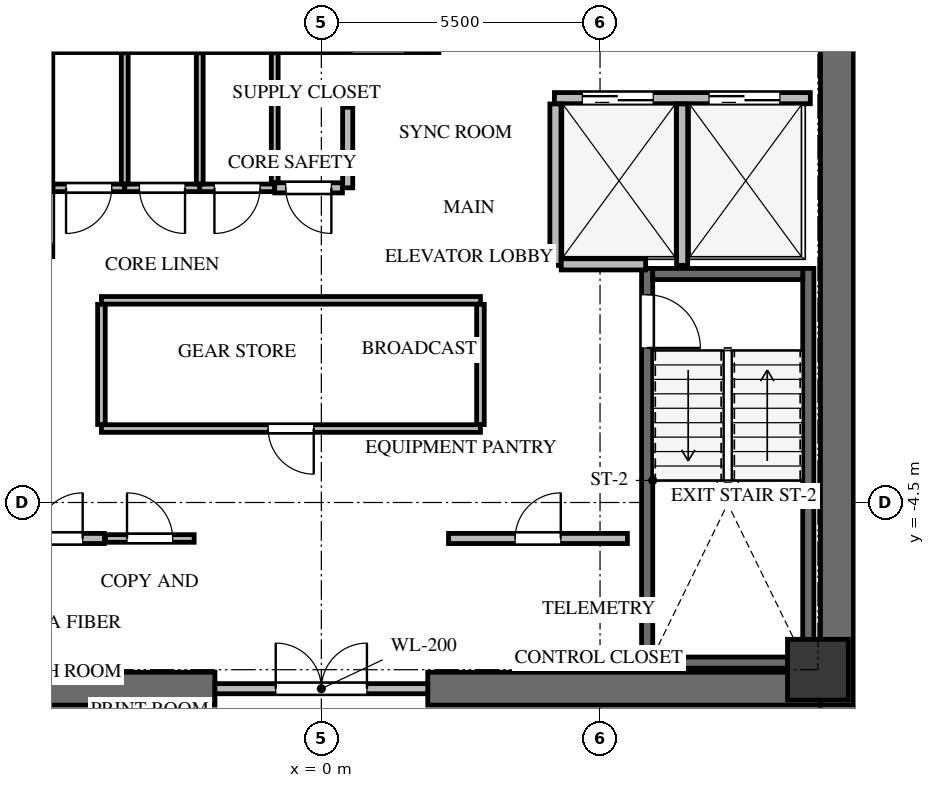
"""IFC4 building model, lengths in metres.
Left out: names, types, materials, properties, quantities, classifications, styles, units other than length and angle.
Written with IfcOpenShell. Run it as: python <this file> out.ifc"""

import sys

from ifc_helpers import new_model, si_unit, direction, frame, frame_2d, origin, origin_2d, place, context, subcontext, project, spatial, rectangle, extrude, source, transform, mapped, element, fill, save


model = new_model("IFC4")
c1 = context("Model", 3, precision=1e-05, world=origin(), true_north=direction((0.0, 1.0)))
c2 = subcontext(c1, "Body", "Model", "MODEL_VIEW")
j1 = project(units=[si_unit("LENGTHUNIT", "METRE"), si_unit("PLANEANGLEUNIT", "RADIAN")], contexts=[c1])
p1 = place(None, origin())
s1 = spatial("IfcSite", under=j1, at=p1, CompositionType="ELEMENT")
p2 = place(p1, origin())
s2 = spatial("IfcBuilding", under=s1, at=p2, CompositionType="ELEMENT")
p3 = place(p2, frame((0.0, 0.0, 180.4)))
s3 = spatial("IfcBuildingStorey", under=s2, at=p3, CompositionType="ELEMENT", Elevation=180.4)
p4 = place(p3, frame((10.175, -8.5, 0.0), z_axis=(0.0, 0.0, 1.0), x_axis=(0.0, 1.0, 0.0)))
e1 = element("IfcWall", 1, at=p4, inside=s3, PredefinedType="SHEAR", context=c2, shape_type="SweptSolid", body=[
    extrude(rectangle(XDim=17.0, YDim=0.65, at=frame_2d((8.5, 0.0))), origin(), (0.0, 0.0, 1.0), 3.3),
])
for number, where, z_axis, x_axis in (
    (2, (-9.85, -8.175, 0.0), (0.0, 0.0, 1.0), (1.0, 0.0, 0.0)),
    (3, (2.1, -8.175, 0.0), (0.0, 0.0, 1.0), (1.0, 0.0, 0.0)),
):
    element("IfcWall", number, at=place(p3, frame(where, z_axis=z_axis, x_axis=x_axis)), inside=s3, PredefinedType="SHEAR", context=c2, shape_type="SweptSolid", body=[
        extrude(rectangle(XDim=7.75, YDim=0.65, at=frame_2d((3.875, 0.0))), origin(), (0.0, 0.0, 1.0), 3.3),
    ])
p5 = place(p3, frame((9.61, -7.77, -0.24), z_axis=(0.0, 0.0, 1.0), x_axis=(0.0, 1.0, 0.0)))
e4 = element("IfcWall", 4, at=p5, inside=s3, PredefinedType="SHEAR", context=c2, shape_type="SweptSolid", body=[
    extrude(rectangle(XDim=7.89, YDim=0.22, at=frame_2d((3.945, 0.0))), origin(), (0.0, 0.0, 1.0), 3.3),
])
p6 = place(p3, frame((6.43, 0.12, -0.24), z_axis=(0.0, 0.0, 1.0), x_axis=(0.0, -1.0, 0.0)))
e5 = element("IfcWall", 5, at=p6, inside=s3, PredefinedType="SHEAR", context=c2, shape_type="SweptSolid", body=[
    extrude(rectangle(XDim=7.89, YDim=0.22, at=frame_2d((3.945, 0.0))), origin(), (0.0, 0.0, 1.0), 3.3),
])
p7 = place(p6, frame((0.52, 0.0, 0.0)))
e6 = element("IfcOpeningElement", 6, at=p7, cuts=e5, PredefinedType="OPENING", context=c2, shape_type="SweptSolid", body=[
    extrude(rectangle(XDim=1.05, YDim=2.15, at=frame_2d((0.525, 1.075))), frame((0.0, 0.12, 0.0), z_axis=(0.0, -1.0, 0.0), x_axis=(1.0, 0.0, 0.0)), (0.0, 0.0, 1.0), 0.24),
])
for number, where, z_axis, x_axis in (
    (7, (6.54, -7.66, -0.24), (0.0, 0.0, 1.0), (1.0, 0.0, 0.0)),
    (8, (9.5, 0.01, -0.24), (0.0, 0.0, 1.0), (-1.0, 0.0, 0.0)),
):
    element("IfcWall", number, at=place(p3, frame(where, z_axis=z_axis, x_axis=x_axis)), inside=s3, PredefinedType="SHEAR", context=c2, shape_type="SweptSolid", body=[
        extrude(rectangle(XDim=2.96, YDim=0.22, at=frame_2d((1.48, 0.0))), origin(), (0.0, 0.0, 1.0), 3.3),
    ])
for number, where, z_axis, x_axis in (
    (9, (2.21, 4.38, -0.24), (0.0, 0.0, 1.0), (0.0, 1.0, 0.0)),
    (10, (-5.36, 7.78, -0.24), (0.0, 0.0, 1.0), (0.0, -1.0, 0.0)),
):
    element("IfcWall", number, at=place(p3, frame(where, z_axis=z_axis, x_axis=x_axis)), inside=s3, PredefinedType="SHEAR", context=c2, shape_type="SweptSolid", body=[
        extrude(rectangle(XDim=3.4, YDim=0.22, at=frame_2d((1.7, 0.0))), origin(), (0.0, 0.0, 1.0), 3.3),
    ])
p8 = place(p3, frame((-5.25, 4.49, -0.24), z_axis=(0.0, 0.0, 1.0), x_axis=(1.0, 0.0, 0.0)))
e11 = element("IfcWall", 11, at=p8, inside=s3, PredefinedType="SHEAR", context=c2, shape_type="SweptSolid", body=[
    extrude(rectangle(XDim=7.35, YDim=0.22, at=frame_2d((3.675, 0.0))), origin(), (0.0, 0.0, 1.0), 3.3),
])
p9 = place(p8, frame((5.85, 0.0, 0.0)))
e12 = element("IfcOpeningElement", 12, at=p9, cuts=e11, PredefinedType="OPENING", context=c2, shape_type="SweptSolid", body=[
    extrude(rectangle(XDim=1.05, YDim=2.15, at=frame_2d((0.525, 1.075))), frame((0.0, 0.12, 0.0), z_axis=(0.0, -1.0, 0.0), x_axis=(1.0, 0.0, 0.0)), (0.0, 0.0, 1.0), 0.24),
])
m1 = source(origin(), c2, "Body", "SweptSolid", [
    extrude(rectangle(XDim=1.2, YDim=1.2, at=origin_2d()), origin(), (0.0, 0.0, 1.0), 3.3),
])
p10 = place(p3, frame((9.8, -7.8, -0.24), z_axis=(0.0, 0.0, 1.0), x_axis=(1.0, 0.0, 0.0)))
e13 = element("IfcColumn", 13, at=p10, inside=s3, PredefinedType="COLUMN", context=c2, shape_type="MappedRepresentation", body=[
    mapped(m1, transform((0.0, 0.0, 0.0), x_axis=(1.0, 0.0, 0.0), y_axis=(0.0, 1.0, 0.0), z_axis=(0.0, 0.0, 1.0), scale=1.0)),
])
p11 = place(p3, frame((-2.1, -8.175, 0.0), z_axis=(0.0, 0.0, 1.0), x_axis=(1.0, 0.0, 0.0)))
e14 = element("IfcWall", 14, at=p11, inside=s3, PredefinedType="SOLIDWALL", context=c2, shape_type="SweptSolid", body=[
    extrude(rectangle(XDim=4.2, YDim=0.2, at=frame_2d((2.1, 0.0))), origin(), (0.0, 0.0, 1.0), 3.045),
])
p12 = place(p11, frame((1.2, 0.0, 0.0)))
e15 = element("IfcOpeningElement", 15, at=p12, cuts=e14, PredefinedType="OPENING", context=c2, shape_type="SweptSolid", body=[
    extrude(rectangle(XDim=1.8, YDim=2.15, at=frame_2d((0.9, 1.075))), frame((0.0, 0.11, 0.0), z_axis=(0.0, -1.0, 0.0), x_axis=(1.0, 0.0, 0.0)), (0.0, 0.0, 1.0), 0.22),
])
p13 = place(p3, frame((-5.4, 0.354, 0.0), z_axis=(0.0, 0.0, 1.0), x_axis=(0.0, 1.0, 0.0)))
e16 = element("IfcWall", 16, at=p13, inside=s3, PredefinedType="SOLIDWALL", context=c2, shape_type="SweptSolid", body=[
    extrude(rectangle(XDim=4.026, YDim=0.2, at=frame_2d((2.013, 0.0))), origin(), (0.0, 0.0, 1.0), 3.045),
])
p14 = place(p13, frame((0.246, 0.0, 0.0)))
e17 = element("IfcOpeningElement", 17, at=p14, cuts=e16, PredefinedType="OPENING", context=c2, shape_type="SweptSolid", body=[
    extrude(rectangle(XDim=1.0, YDim=2.15, at=frame_2d((0.5, 1.075))), frame((0.0, 0.11, 0.0), z_axis=(0.0, -1.0, 0.0), x_axis=(1.0, 0.0, 0.0)), (0.0, 0.0, 1.0), 0.22),
])
p15 = place(p3, frame((4.6, 3.48, 0.0), z_axis=(0.0, 0.0, 1.0), x_axis=(1.0, 0.0, 0.0)))
e18 = element("IfcWall", 18, at=p15, inside=s3, PredefinedType="SOLIDWALL", context=c2, shape_type="SweptSolid", body=[
    extrude(rectangle(XDim=5.05, YDim=0.22, at=frame_2d((2.525, 0.0))), origin(), (0.0, 0.0, 1.0), 3.045),
])
p16 = place(p15, frame((0.55, 0.0, 0.0)))
e19 = element("IfcOpeningElement", 19, at=p16, cuts=e18, PredefinedType="OPENING", context=c2, shape_type="SweptSolid", body=[
    extrude(rectangle(XDim=1.4, YDim=2.15, at=frame_2d((0.7, 1.075))), frame((0.0, 0.12, 0.0), z_axis=(0.0, -1.0, 0.0), x_axis=(1.0, 0.0, 0.0)), (0.0, 0.0, 1.0), 0.24),
])
p17 = place(p15, frame((3.05, 0.0, 0.0)))
e20 = element("IfcOpeningElement", 20, at=p17, cuts=e18, PredefinedType="OPENING", context=c2, shape_type="SweptSolid", body=[
    extrude(rectangle(XDim=1.4, YDim=2.15, at=frame_2d((0.7, 1.075))), frame((0.0, 0.12, 0.0), z_axis=(0.0, -1.0, 0.0), x_axis=(1.0, 0.0, 0.0)), (0.0, 0.0, 1.0), 0.24),
])
for number, where, z_axis, x_axis in (
    (21, (4.62, 0.18, 0.0), (0.0, 0.0, 1.0), (0.0, 1.0, 0.0)),
    (22, (7.12, 0.18, 0.0), (0.0, 0.0, 1.0), (0.0, 1.0, 0.0)),
):
    element("IfcWall", number, at=place(p3, frame(where, z_axis=z_axis, x_axis=x_axis)), inside=s3, PredefinedType="SOLIDWALL", context=c2, shape_type="SweptSolid", body=[
        extrude(rectangle(XDim=3.186, YDim=0.22, at=frame_2d((1.593, 0.0))), origin(), (0.0, 0.0, 1.0), 3.045),
    ])
p18 = place(p3, frame((4.734, 0.2, 0.0), z_axis=(0.0, 0.0, 1.0), x_axis=(1.0, 0.0, 0.0)))
e23 = element("IfcWall", 23, at=p18, inside=s3, PredefinedType="SOLIDWALL", context=c2, shape_type="SweptSolid", body=[
    extrude(rectangle(XDim=1.666, YDim=0.22, at=frame_2d((0.833, 0.0))), origin(), (0.0, 0.0, 1.0), 3.045),
])
p19 = place(p3, frame((-6.04, -5.21, 0.0), z_axis=(0.0, 0.0, 1.0), x_axis=(1.0, 0.0, 0.0)))
e24 = element("IfcWall", 24, at=p19, inside=s3, PredefinedType="SOLIDWALL", context=c2, shape_type="SweptSolid", body=[
    extrude(rectangle(XDim=1.76, YDim=0.2, at=frame_2d((0.88, 0.0))), origin(), (0.0, 0.0, 1.0), 3.045),
])
p20 = place(p19, frame((0.43, 0.0, 0.0)))
e25 = element("IfcOpeningElement", 25, at=p20, cuts=e24, PredefinedType="OPENING", context=c2, shape_type="SweptSolid", body=[
    extrude(rectangle(XDim=0.9, YDim=2.05, at=frame_2d((0.45, 1.025))), frame((0.0, 0.11, 0.0), z_axis=(0.0, -1.0, 0.0), x_axis=(1.0, 0.0, 0.0)), (0.0, 0.0, 1.0), 0.22),
])
p21 = place(p3, frame((-4.26, -5.21, 0.0), z_axis=(0.0, 0.0, 1.0), x_axis=(1.0, 0.0, 0.0)))
e26 = element("IfcWall", 26, at=p21, inside=s3, PredefinedType="PARTITIONING", context=c2, shape_type="SweptSolid", body=[
    extrude(rectangle(XDim=1.75, YDim=0.15, at=frame_2d((0.875, 0.0))), origin(), (0.0, 0.0, 1.0), 3.045),
])
p22 = place(p21, frame((0.425, 0.0, 0.0)))
e27 = element("IfcOpeningElement", 27, at=p22, cuts=e26, PredefinedType="OPENING", context=c2, shape_type="SweptSolid", body=[
    extrude(rectangle(XDim=0.9, YDim=2.05, at=frame_2d((0.45, 1.025))), frame((0.0, 0.085, 0.0), z_axis=(0.0, -1.0, 0.0), x_axis=(1.0, 0.0, 0.0)), (0.0, 0.0, 1.0), 0.17),
])
p23 = place(p3, frame((2.51, -5.21, 0.0), z_axis=(0.0, 0.0, 1.0), x_axis=(1.0, 0.0, 0.0)))
e28 = element("IfcWall", 28, at=p23, inside=s3, PredefinedType="SOLIDWALL", context=c2, shape_type="SweptSolid", body=[
    extrude(rectangle(XDim=3.53, YDim=0.2, at=frame_2d((1.765, 0.0))), origin(), (0.0, 0.0, 1.0), 3.045),
])
p24 = place(p23, frame((1.315, 0.0, 0.0)))
e29 = element("IfcOpeningElement", 29, at=p24, cuts=e28, PredefinedType="OPENING", context=c2, shape_type="SweptSolid", body=[
    extrude(rectangle(XDim=0.9, YDim=2.05, at=frame_2d((0.45, 1.025))), frame((0.0, 0.11, 0.0), z_axis=(0.0, -1.0, 0.0), x_axis=(1.0, 0.0, 0.0)), (0.0, 0.0, 1.0), 0.22),
])
p25 = place(p3, frame((3.14, -3.04, 0.0), z_axis=(0.0, 0.0, 1.0), x_axis=(-1.0, 0.0, 0.0)))
e30 = element("IfcWall", 30, at=p25, inside=s3, PredefinedType="PARTITIONING", context=c2, shape_type="SweptSolid", body=[
    extrude(rectangle(XDim=7.48, YDim=0.15, at=frame_2d((3.74, 0.0))), origin(), (0.0, 0.0, 1.0), 3.045),
])
p26 = place(p25, frame((3.29, 0.0, 0.0)))
e31 = element("IfcOpeningElement", 31, at=p26, cuts=e30, PredefinedType="OPENING", context=c2, shape_type="SweptSolid", body=[
    extrude(rectangle(XDim=0.9, YDim=2.05, at=frame_2d((0.45, 1.025))), frame((0.0, 0.085, 0.0), z_axis=(0.0, -1.0, 0.0), x_axis=(1.0, 0.0, 0.0)), (0.0, 0.0, 1.0), 0.17),
])
p27 = place(p3, frame((-4.34, -0.51, 0.0), z_axis=(0.0, 0.0, 1.0), x_axis=(1.0, 0.0, 0.0)))
e32 = element("IfcWall", 32, at=p27, inside=s3, PredefinedType="PARTITIONING", context=c2, shape_type="SweptSolid", body=[
    extrude(rectangle(XDim=7.48, YDim=0.15, at=frame_2d((3.74, 0.0))), origin(), (0.0, 0.0, 1.0), 3.045),
])
for number, where, z_axis, x_axis in (
    (33, (-4.34, -2.961, 0.0), (0.0, 0.0, 1.0), (0.0, 1.0, 0.0)),
    (34, (3.14, -0.589, 0.0), (0.0, 0.0, 1.0), (0.0, -1.0, 0.0)),
):
    element("IfcWall", number, at=place(p3, frame(where, z_axis=z_axis, x_axis=x_axis)), inside=s3, PredefinedType="PARTITIONING", context=c2, shape_type="SweptSolid", body=[
        extrude(rectangle(XDim=2.372, YDim=0.15, at=frame_2d((1.186, 0.0))), origin(), (0.0, 0.0, 1.0), 3.045),
    ])
p28 = place(p3, frame((-3.88, 1.71, 0.0), z_axis=(0.0, 0.0, 1.0), x_axis=(-1.0, 0.0, 0.0)))
e35 = element("IfcWall", 35, at=p28, inside=s3, PredefinedType="PARTITIONING", context=c2, shape_type="SweptSolid", body=[
    extrude(rectangle(XDim=1.416, YDim=0.15, at=frame_2d((0.708, 0.0))), origin(), (0.0, 0.0, 1.0), 3.045),
])
p29 = place(p28, frame((0.258, 0.0, 0.0)))
e36 = element("IfcOpeningElement", 36, at=p29, cuts=e35, PredefinedType="OPENING", context=c2, shape_type="SweptSolid", body=[
    extrude(rectangle(XDim=0.9, YDim=2.05, at=frame_2d((0.45, 1.025))), frame((0.0, 0.085, 0.0), z_axis=(0.0, -1.0, 0.0), x_axis=(1.0, 0.0, 0.0)), (0.0, 0.0, 1.0), 0.17),
])
p30 = place(p3, frame((-2.4, 1.71, 0.0), z_axis=(0.0, 0.0, 1.0), x_axis=(-1.0, 0.0, 0.0)))
e37 = element("IfcWall", 37, at=p30, inside=s3, PredefinedType="PARTITIONING", context=c2, shape_type="SweptSolid", body=[
    extrude(rectangle(XDim=1.48, YDim=0.15, at=frame_2d((0.74, 0.0))), origin(), (0.0, 0.0, 1.0), 3.045),
])
p31 = place(p30, frame((0.29, 0.0, 0.0)))
e38 = element("IfcOpeningElement", 38, at=p31, cuts=e37, PredefinedType="OPENING", context=c2, shape_type="SweptSolid", body=[
    extrude(rectangle(XDim=0.9, YDim=2.05, at=frame_2d((0.45, 1.025))), frame((0.0, 0.085, 0.0), z_axis=(0.0, -1.0, 0.0), x_axis=(1.0, 0.0, 0.0)), (0.0, 0.0, 1.0), 0.17),
])
p32 = place(p3, frame((-0.92, 1.71, 0.0), z_axis=(0.0, 0.0, 1.0), x_axis=(-1.0, 0.0, 0.0)))
e39 = element("IfcWall", 39, at=p32, inside=s3, PredefinedType="PARTITIONING", context=c2, shape_type="SweptSolid", body=[
    extrude(rectangle(XDim=1.48, YDim=0.15, at=frame_2d((0.74, 0.0))), origin(), (0.0, 0.0, 1.0), 3.045),
])
p33 = place(p32, frame((0.29, 0.0, 0.0)))
e40 = element("IfcOpeningElement", 40, at=p33, cuts=e39, PredefinedType="OPENING", context=c2, shape_type="SweptSolid", body=[
    extrude(rectangle(XDim=0.9, YDim=2.05, at=frame_2d((0.45, 1.025))), frame((0.0, 0.085, 0.0), z_axis=(0.0, -1.0, 0.0), x_axis=(1.0, 0.0, 0.0)), (0.0, 0.0, 1.0), 0.17),
])
p34 = place(p3, frame((0.52, 3.3, 0.0), z_axis=(0.0, 0.0, 1.0), x_axis=(0.0, -1.0, 0.0)))
e41 = element("IfcWall", 41, at=p34, inside=s3, PredefinedType="SOLIDWALL", context=c2, shape_type="SweptSolid", body=[
    extrude(rectangle(XDim=1.59, YDim=0.2, at=frame_2d((0.795, 0.0))), origin(), (0.0, 0.0, 1.0), 3.045),
])
p35 = place(p3, frame((0.416, 1.71, 0.0), z_axis=(0.0, 0.0, 1.0), x_axis=(-1.0, 0.0, 0.0)))
e42 = element("IfcWall", 42, at=p35, inside=s3, PredefinedType="SOLIDWALL", context=c2, shape_type="SweptSolid", body=[
    extrude(rectangle(XDim=1.336, YDim=0.2, at=frame_2d((0.668, 0.0))), origin(), (0.0, 0.0, 1.0), 3.045),
])
p36 = place(p35, frame((0.218, 0.0, 0.0)))
e43 = element("IfcOpeningElement", 43, at=p36, cuts=e42, PredefinedType="OPENING", context=c2, shape_type="SweptSolid", body=[
    extrude(rectangle(XDim=0.9, YDim=2.05, at=frame_2d((0.45, 1.025))), frame((0.0, 0.11, 0.0), z_axis=(0.0, -1.0, 0.0), x_axis=(1.0, 0.0, 0.0)), (0.0, 0.0, 1.0), 0.22),
])
for number, where, z_axis, x_axis in (
    (44, (-3.88, 4.375, 0.0), (0.0, 0.0, 1.0), (0.0, -1.0, 0.0)),
    (45, (-2.4, 4.375, 0.0), (0.0, 0.0, 1.0), (0.0, -1.0, 0.0)),
):
    element("IfcWall", number, at=place(p3, frame(where, z_axis=z_axis, x_axis=x_axis)), inside=s3, PredefinedType="PARTITIONING", context=c2, shape_type="SweptSolid", body=[
        extrude(rectangle(XDim=2.586, YDim=0.135, at=frame_2d((1.293, 0.0))), origin(), (0.0, 0.0, 1.0), 3.045),
    ])
p37 = place(p3, frame((-0.92, 4.375, 0.0), z_axis=(0.0, 0.0, 1.0), x_axis=(0.0, -1.0, 0.0)))
e46 = element("IfcWall", 46, at=p37, inside=s3, PredefinedType="PARTITIONING", context=c2, shape_type="SweptSolid", body=[
    extrude(rectangle(XDim=2.561, YDim=0.135, at=frame_2d((1.281, 0.0))), origin(), (0.0, 0.0, 1.0), 3.045),
])
m2 = source(origin(), c2, "Body", "SweptSolid", [
    extrude(rectangle(XDim=1.05, YDim=2.15, at=frame_2d((0.525, 1.075))), frame((0.0, 0.025, 0.0), z_axis=(0.0, -1.0, 0.0), x_axis=(1.0, 0.0, 0.0)), (0.0, 0.0, 1.0), 0.05),
])
p38 = place(p7, origin())
e47 = element("IfcDoor", 47, at=p38, inside=s3, OperationType="SINGLE_SWING_RIGHT", PredefinedType="DOOR", context=c2, shape_type="MappedRepresentation", body=[
    mapped(m2, transform((0.0, 0.0, 0.0), x_axis=(1.0, 0.0, 0.0), y_axis=(0.0, 1.0, 0.0), z_axis=(0.0, 0.0, 1.0), scale=1.0)),
])
fill(e6, e47)
m3 = source(origin(), c2, "Body", "SweptSolid", [
    extrude(rectangle(XDim=1.8, YDim=2.15, at=frame_2d((0.9, 1.075))), frame((0.0, 0.025, 0.0), z_axis=(0.0, -1.0, 0.0), x_axis=(1.0, 0.0, 0.0)), (0.0, 0.0, 1.0), 0.05),
])
p39 = place(p12, origin())
e48 = element("IfcDoor", 48, at=p39, inside=s3, OperationType="DOUBLE_DOOR_SINGLE_SWING", PredefinedType="DOOR", context=c2, shape_type="MappedRepresentation", body=[
    mapped(m3, transform((0.0, 0.0, 0.0), x_axis=(1.0, 0.0, 0.0), y_axis=(0.0, 1.0, 0.0), z_axis=(0.0, 0.0, 1.0), scale=1.0)),
])
fill(e15, e48)
m4 = source(origin(), c2, "Body", "SweptSolid", [
    extrude(rectangle(XDim=1.4, YDim=2.15, at=frame_2d((0.7, 1.075))), frame((0.0, 0.025, 0.0), z_axis=(0.0, -1.0, 0.0), x_axis=(1.0, 0.0, 0.0)), (0.0, 0.0, 1.0), 0.05),
])
p40 = place(p16, origin())
e49 = element("IfcDoor", 49, at=p40, inside=s3, OperationType="DOUBLE_DOOR_SLIDING", PredefinedType="DOOR", context=c2, shape_type="MappedRepresentation", body=[
    mapped(m4, transform((0.0, 0.0, 0.0), x_axis=(1.0, 0.0, 0.0), y_axis=(0.0, 1.0, 0.0), z_axis=(0.0, 0.0, 1.0), scale=1.0)),
])
fill(e19, e49)
p41 = place(p17, origin())
e50 = element("IfcDoor", 50, at=p41, inside=s3, OperationType="DOUBLE_DOOR_SLIDING", PredefinedType="DOOR", context=c2, shape_type="MappedRepresentation", body=[
    mapped(m4, transform((0.0, 0.0, 0.0), x_axis=(1.0, 0.0, 0.0), y_axis=(0.0, 1.0, 0.0), z_axis=(0.0, 0.0, 1.0), scale=1.0)),
])
fill(e20, e50)
m5 = source(origin(), c2, "Body", "SweptSolid", [
    extrude(rectangle(XDim=0.9, YDim=2.05, at=frame_2d((0.45, 1.025))), frame((0.0, 0.025, 0.0), z_axis=(0.0, -1.0, 0.0), x_axis=(1.0, 0.0, 0.0)), (0.0, 0.0, 1.0), 0.05),
])
p42 = place(p20, origin())
e51 = element("IfcDoor", 51, at=p42, inside=s3, OperationType="SINGLE_SWING_RIGHT", PredefinedType="DOOR", context=c2, shape_type="MappedRepresentation", body=[
    mapped(m5, transform((0.0, 0.0, 0.0), x_axis=(1.0, 0.0, 0.0), y_axis=(0.0, 1.0, 0.0), z_axis=(0.0, 0.0, 1.0), scale=1.0)),
])
fill(e25, e51)
m6 = source(origin(), c2, "Body", "SweptSolid", [
    extrude(rectangle(XDim=0.9, YDim=2.05, at=frame_2d((0.45, 1.025))), frame((0.0, 0.025, 0.0), z_axis=(0.0, -1.0, 0.0), x_axis=(1.0, 0.0, 0.0)), (0.0, 0.0, 1.0), 0.05),
])
p43 = place(p22, origin())
e52 = element("IfcDoor", 52, at=p43, inside=s3, OperationType="SINGLE_SWING_LEFT", PredefinedType="DOOR", context=c2, shape_type="MappedRepresentation", body=[
    mapped(m6, transform((0.0, 0.0, 0.0), x_axis=(1.0, 0.0, 0.0), y_axis=(0.0, 1.0, 0.0), z_axis=(0.0, 0.0, 1.0), scale=1.0)),
])
fill(e27, e52)
p44 = place(p24, origin())
e53 = element("IfcDoor", 53, at=p44, inside=s3, OperationType="SINGLE_SWING_RIGHT", PredefinedType="DOOR", context=c2, shape_type="MappedRepresentation", body=[
    mapped(m5, transform((0.0, 0.0, 0.0), x_axis=(1.0, 0.0, 0.0), y_axis=(0.0, 1.0, 0.0), z_axis=(0.0, 0.0, 1.0), scale=1.0)),
])
fill(e29, e53)
p45 = place(p26, origin())
e54 = element("IfcDoor", 54, at=p45, inside=s3, OperationType="SINGLE_SWING_LEFT", PredefinedType="DOOR", context=c2, shape_type="MappedRepresentation", body=[
    mapped(m6, transform((0.0, 0.0, 0.0), x_axis=(1.0, 0.0, 0.0), y_axis=(0.0, 1.0, 0.0), z_axis=(0.0, 0.0, 1.0), scale=1.0)),
])
fill(e31, e54)
p46 = place(p29, origin())
e55 = element("IfcDoor", 55, at=p46, inside=s3, OperationType="SINGLE_SWING_RIGHT", PredefinedType="DOOR", context=c2, shape_type="MappedRepresentation", body=[
    mapped(m5, transform((0.0, 0.0, 0.0), x_axis=(1.0, 0.0, 0.0), y_axis=(0.0, 1.0, 0.0), z_axis=(0.0, 0.0, 1.0), scale=1.0)),
])
fill(e36, e55)
p47 = place(p31, origin())
e56 = element("IfcDoor", 56, at=p47, inside=s3, OperationType="SINGLE_SWING_LEFT", PredefinedType="DOOR", context=c2, shape_type="MappedRepresentation", body=[
    mapped(m6, transform((0.0, 0.0, 0.0), x_axis=(1.0, 0.0, 0.0), y_axis=(0.0, 1.0, 0.0), z_axis=(0.0, 0.0, 1.0), scale=1.0)),
])
fill(e38, e56)
p48 = place(p33, origin())
e57 = element("IfcDoor", 57, at=p48, inside=s3, OperationType="SINGLE_SWING_RIGHT", PredefinedType="DOOR", context=c2, shape_type="MappedRepresentation", body=[
    mapped(m5, transform((0.0, 0.0, 0.0), x_axis=(1.0, 0.0, 0.0), y_axis=(0.0, 1.0, 0.0), z_axis=(0.0, 0.0, 1.0), scale=1.0)),
])
fill(e40, e57)
p49 = place(p36, origin())
e58 = element("IfcDoor", 58, at=p49, inside=s3, OperationType="SINGLE_SWING_LEFT", PredefinedType="DOOR", context=c2, shape_type="MappedRepresentation", body=[
    mapped(m6, transform((0.0, 0.0, 0.0), x_axis=(1.0, 0.0, 0.0), y_axis=(0.0, 1.0, 0.0), z_axis=(0.0, 0.0, 1.0), scale=1.0)),
])
fill(e43, e58)
save(model, sys.argv[1])
